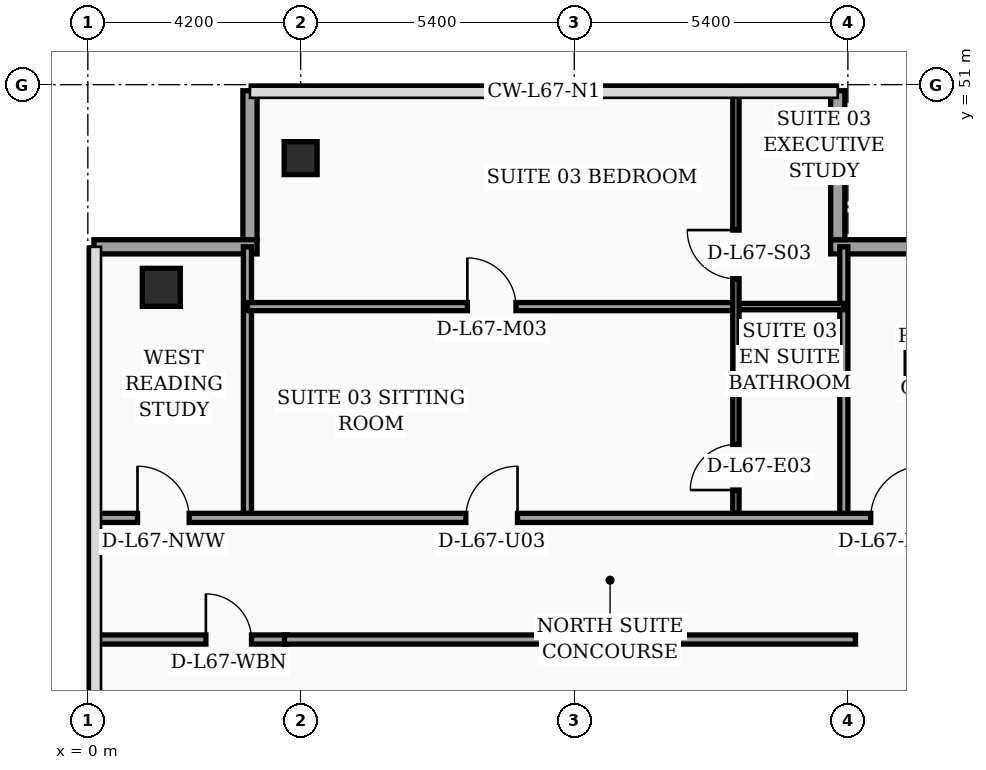
"""IFC4 building model, lengths in metres.
Left out: names, types, materials, properties, quantities, classifications, styles, units other than length and angle.
Written with IfcOpenShell. Run it as: python <this file> out.ifc"""

import sys

from ifc_helpers import new_model, si_unit, direction, frame, frame_2d, origin, origin_2d, place, context, subcontext, project, spatial, rectangle, hollow_rectangle, extrude, element, fill, save


model = new_model("IFC4")
c1 = context("Model", 3, precision=1e-05, world=origin(), true_north=direction((0.0, 1.0)))
c2 = subcontext(c1, "Body", "Model", "MODEL_VIEW")
j1 = project(units=[si_unit("LENGTHUNIT", "METRE"), si_unit("PLANEANGLEUNIT", "RADIAN")], contexts=[c1])
p1 = place(None, origin())
s1 = spatial("IfcSite", under=j1, at=p1, CompositionType="ELEMENT")
p2 = place(p1, origin())
s2 = spatial("IfcBuilding", under=s1, at=p2, CompositionType="ELEMENT")
p3 = place(p2, frame((0.0, 0.0, 271.1)))
s3 = spatial("IfcBuildingStorey", under=s2, at=p3, CompositionType="ELEMENT", Elevation=271.1)
p4 = place(p3, frame((1.45, 47.0, 0.0), z_axis=(0.0, 0.0, 1.0), x_axis=(1.0, 0.0, 0.0)))
e1 = element("IfcColumn", 1, at=p4, inside=s3, PredefinedType="COLUMN", context=c2, shape_type="SweptSolid", body=[
    extrude(hollow_rectangle(XDim=0.75, YDim=0.75, WallThickness=0.032, at=origin_2d()), origin(), (0.0, 0.0, 1.0), 3.56),
])
p5 = place(p3, frame((4.2, 49.55, 0.0), z_axis=(0.0, 0.0, 1.0), x_axis=(1.0, 0.0, 0.0)))
e2 = element("IfcColumn", 2, at=p5, inside=s3, PredefinedType="COLUMN", context=c2, shape_type="SweptSolid", body=[
    extrude(hollow_rectangle(XDim=0.65, YDim=0.65, WallThickness=0.028, at=origin_2d()), origin(), (0.0, 0.0, 1.0), 3.56),
])
p6 = place(p3, frame((17.9, 47.8, 0.0), z_axis=(0.0, 0.0, 1.0), x_axis=(-1.0, 0.0, 0.0)))
e3 = element("IfcWall", 3, at=p6, inside=s3, PredefinedType="SOLIDWALL", context=c2, shape_type="SweptSolid", body=[
    extrude(rectangle(XDim=3.24, YDim=0.28, at=frame_2d((1.62, 0.0))), origin(), (0.0, 0.0, 1.0), 3.56),
])
p7 = place(p3, frame((14.8, 47.94, 0.0), z_axis=(0.0, 0.0, 1.0), x_axis=(0.0, 1.0, 0.0)))
e4 = element("IfcWall", 4, at=p7, inside=s3, PredefinedType="SOLIDWALL", context=c2, shape_type="SweptSolid", body=[
    extrude(rectangle(XDim=2.94, YDim=0.28, at=frame_2d((1.47, 0.0))), origin(), (0.0, 0.0, 1.0), 3.56),
])
p8 = place(p3, frame((3.2, 50.88, 0.0), z_axis=(0.0, 0.0, 1.0), x_axis=(0.0, -1.0, 0.0)))
e5 = element("IfcWall", 5, at=p8, inside=s3, PredefinedType="SOLIDWALL", context=c2, shape_type="SweptSolid", body=[
    extrude(rectangle(XDim=2.94, YDim=0.28, at=frame_2d((1.47, 0.0))), origin(), (0.0, 0.0, 1.0), 3.09),
])
p9 = place(p3, frame((3.34, 47.8, 0.0), z_axis=(0.0, 0.0, 1.0), x_axis=(-1.0, 0.0, 0.0)))
e6 = element("IfcWall", 6, at=p9, inside=s3, PredefinedType="SOLIDWALL", context=c2, shape_type="SweptSolid", body=[
    extrude(rectangle(XDim=3.22, YDim=0.28, at=frame_2d((1.61, 0.0))), origin(), (0.0, 0.0, 1.0), 3.09),
])
p10 = place(p3, frame((0.08, 40.05, 0.0), z_axis=(0.0, 0.0, 1.0), x_axis=(1.0, 0.0, 0.0)))
e7 = element("IfcWall", 7, at=p10, inside=s3, PredefinedType="PARTITIONING", context=c2, shape_type="SweptSolid", body=[
    extrude(rectangle(XDim=3.85, YDim=0.18, at=frame_2d((1.925, 0.0))), origin(), (0.0, 0.0, 1.0), 2.99),
])
p11 = place(p10, frame((2.25, 0.0, 0.0)))
e8 = element("IfcOpeningElement", 8, at=p11, cuts=e7, PredefinedType="OPENING", context=c2, shape_type="SweptSolid", body=[
    extrude(rectangle(XDim=0.9, YDim=2.15, at=frame_2d((0.45, 1.075))), frame((0.0, 0.1, 0.0), z_axis=(0.0, -1.0, 0.0), x_axis=(1.0, 0.0, 0.0)), (0.0, 0.0, 1.0), 0.2),
])
p12 = place(p3, frame((3.15, 42.45, 0.0), z_axis=(0.0, 0.0, 1.0), x_axis=(0.0, 1.0, 0.0)))
e9 = element("IfcWall", 9, at=p12, inside=s3, PredefinedType="PARTITIONING", context=c2, shape_type="SweptSolid", body=[
    extrude(rectangle(XDim=5.35, YDim=0.16, at=frame_2d((2.675, 0.0))), origin(), (0.0, 0.0, 1.0), 3.14),
])
p13 = place(p3, frame((14.92, 42.45, 0.0), z_axis=(0.0, 0.0, 1.0), x_axis=(0.0, 1.0, 0.0)))
e10 = element("IfcWall", 10, at=p13, inside=s3, PredefinedType="PARTITIONING", context=c2, shape_type="SweptSolid", body=[
    extrude(rectangle(XDim=5.35, YDim=0.16, at=frame_2d((2.675, 0.0))), origin(), (0.0, 0.0, 1.0), 3.09),
])
p14 = place(p3, frame((12.79, 46.62, 0.0), z_axis=(0.0, 0.0, 1.0), x_axis=(1.0, 0.0, 0.0)))
e11 = element("IfcWall", 11, at=p14, inside=s3, PredefinedType="PARTITIONING", context=c2, shape_type="SweptSolid", body=[
    extrude(rectangle(XDim=2.13, YDim=0.125, at=frame_2d((1.065, 0.0))), origin(), (0.0, 0.0, 1.0), 3.09),
])
p15 = place(p3, frame((3.15, 46.62, 0.0), z_axis=(0.0, 0.0, 1.0), x_axis=(1.0, 0.0, 0.0)))
e12 = element("IfcWall", 12, at=p15, inside=s3, PredefinedType="PARTITIONING", context=c2, shape_type="SweptSolid", body=[
    extrude(rectangle(XDim=9.64, YDim=0.16, at=frame_2d((4.82, 0.0))), origin(), (0.0, 0.0, 1.0), 2.99),
])
p16 = place(p15, frame((4.34, 0.0, 0.0)))
e13 = element("IfcOpeningElement", 13, at=p16, cuts=e12, PredefinedType="OPENING", context=c2, shape_type="SweptSolid", body=[
    extrude(rectangle(XDim=0.96, YDim=2.2, at=frame_2d((0.48, 1.1))), frame((0.0, 0.09, 0.0), z_axis=(0.0, -1.0, 0.0), x_axis=(1.0, 0.0, 0.0)), (0.0, 0.0, 1.0), 0.18),
])
p17 = place(p3, frame((12.79, 42.45, 0.0), z_axis=(0.0, 0.0, 1.0), x_axis=(0.0, 1.0, 0.0)))
e14 = element("IfcWall", 14, at=p17, inside=s3, PredefinedType="PARTITIONING", context=c2, shape_type="SweptSolid", body=[
    extrude(rectangle(XDim=8.49, YDim=0.125, at=frame_2d((4.245, 0.0))), origin(), (0.0, 0.0, 1.0), 3.09),
])
p18 = place(p17, frame((0.55, 0.0, 0.0)))
e15 = element("IfcOpeningElement", 15, at=p18, cuts=e14, PredefinedType="OPENING", context=c2, shape_type="SweptSolid", body=[
    extrude(rectangle(XDim=0.9, YDim=2.15, at=frame_2d((0.45, 1.075))), frame((0.0, 0.073, 0.0), z_axis=(0.0, -1.0, 0.0), x_axis=(1.0, 0.0, 0.0)), (0.0, 0.0, 1.0), 0.145),
])
p19 = place(p17, frame((4.72, 0.0, 0.0)))
e16 = element("IfcOpeningElement", 16, at=p19, cuts=e14, PredefinedType="OPENING", context=c2, shape_type="SweptSolid", body=[
    extrude(rectangle(XDim=0.96, YDim=2.2, at=frame_2d((0.48, 1.1))), frame((0.0, 0.073, 0.0), z_axis=(0.0, -1.0, 0.0), x_axis=(1.0, 0.0, 0.0)), (0.0, 0.0, 1.0), 0.145),
])
p20 = place(p3, frame((0.08, 42.45, 0.0), z_axis=(0.0, 0.0, 1.0), x_axis=(1.0, 0.0, 0.0)))
e17 = element("IfcWall", 17, at=p20, inside=s3, PredefinedType="PARTITIONING", context=c2, shape_type="SweptSolid", body=[
    extrude(rectangle(XDim=17.77, YDim=0.18, at=frame_2d((8.885, 0.0))), origin(), (0.0, 0.0, 1.0), 2.99),
])
p21 = place(p20, frame((0.9, 0.0, 0.0)))
e18 = element("IfcOpeningElement", 18, at=p21, cuts=e17, PredefinedType="OPENING", context=c2, shape_type="SweptSolid", body=[
    extrude(rectangle(XDim=1.02, YDim=2.2, at=frame_2d((0.51, 1.1))), frame((0.0, 0.1, 0.0), z_axis=(0.0, -1.0, 0.0), x_axis=(1.0, 0.0, 0.0)), (0.0, 0.0, 1.0), 0.2),
])
p22 = place(p20, frame((7.38, 0.0, 0.0)))
e19 = element("IfcOpeningElement", 19, at=p22, cuts=e17, PredefinedType="OPENING", context=c2, shape_type="SweptSolid", body=[
    extrude(rectangle(XDim=1.02, YDim=2.2, at=frame_2d((0.51, 1.1))), frame((0.0, 0.1, 0.0), z_axis=(0.0, -1.0, 0.0), x_axis=(1.0, 0.0, 0.0)), (0.0, 0.0, 1.0), 0.2),
])
p23 = place(p20, frame((15.37, 0.0, 0.0)))
e20 = element("IfcOpeningElement", 20, at=p23, cuts=e17, PredefinedType="OPENING", context=c2, shape_type="SweptSolid", body=[
    extrude(rectangle(XDim=1.02, YDim=2.2, at=frame_2d((0.51, 1.1))), frame((0.0, 0.1, 0.0), z_axis=(0.0, -1.0, 0.0), x_axis=(1.0, 0.0, 0.0)), (0.0, 0.0, 1.0), 0.2),
])
p24 = place(p3, frame((3.88, 40.05, 0.0), z_axis=(0.0, 0.0, 1.0), x_axis=(1.0, 0.0, 0.0)))
e21 = element("IfcWall", 21, at=p24, inside=s3, PredefinedType="PARTITIONING", context=c2, shape_type="SweptSolid", body=[
    extrude(rectangle(XDim=11.27, YDim=0.18, at=frame_2d((5.635, 0.0))), origin(), (0.0, 0.0, 1.0), 2.99),
])
p25 = place(p11, origin())
e22 = element("IfcDoor", 22, at=p25, inside=s3, OperationType="SINGLE_SWING_LEFT", PredefinedType="DOOR", context=c2, shape_type="SweptSolid", body=[
    extrude(rectangle(XDim=0.9, YDim=2.15, at=frame_2d((0.45, 1.075))), frame((0.0, 0.025, 0.0), z_axis=(0.0, -1.0, 0.0), x_axis=(1.0, 0.0, 0.0)), (0.0, 0.0, 1.0), 0.05),
])
fill(e8, e22)
p26 = place(p16, origin())
e23 = element("IfcDoor", 23, at=p26, inside=s3, OperationType="SINGLE_SWING_LEFT", PredefinedType="DOOR", context=c2, shape_type="SweptSolid", body=[
    extrude(rectangle(XDim=0.96, YDim=2.2, at=frame_2d((0.48, 1.1))), frame((0.0, 0.025, 0.0), z_axis=(0.0, -1.0, 0.0), x_axis=(1.0, 0.0, 0.0)), (0.0, 0.0, 1.0), 0.05),
])
fill(e13, e23)
p27 = place(p18, origin())
e24 = element("IfcDoor", 24, at=p27, inside=s3, OperationType="SINGLE_SWING_LEFT", PredefinedType="DOOR", context=c2, shape_type="SweptSolid", body=[
    extrude(rectangle(XDim=0.9, YDim=2.15, at=frame_2d((0.45, 1.075))), frame((0.0, 0.025, 0.0), z_axis=(0.0, -1.0, 0.0), x_axis=(1.0, 0.0, 0.0)), (0.0, 0.0, 1.0), 0.05),
])
fill(e15, e24)
p28 = place(p19, origin())
e25 = element("IfcDoor", 25, at=p28, inside=s3, OperationType="SINGLE_SWING_RIGHT", PredefinedType="DOOR", context=c2, shape_type="SweptSolid", body=[
    extrude(rectangle(XDim=0.96, YDim=2.2, at=frame_2d((0.48, 1.1))), frame((0.0, 0.025, 0.0), z_axis=(0.0, -1.0, 0.0), x_axis=(1.0, 0.0, 0.0)), (0.0, 0.0, 1.0), 0.05),
])
fill(e16, e25)
p29 = place(p21, origin())
e26 = element("IfcDoor", 26, at=p29, inside=s3, OperationType="SINGLE_SWING_LEFT", PredefinedType="DOOR", context=c2, shape_type="SweptSolid", body=[
    extrude(rectangle(XDim=1.02, YDim=2.2, at=frame_2d((0.51, 1.1))), frame((0.0, 0.025, 0.0), z_axis=(0.0, -1.0, 0.0), x_axis=(1.0, 0.0, 0.0)), (0.0, 0.0, 1.0), 0.05),
])
fill(e18, e26)
p30 = place(p22, origin())
e27 = element("IfcDoor", 27, at=p30, inside=s3, OperationType="SINGLE_SWING_RIGHT", PredefinedType="DOOR", context=c2, shape_type="SweptSolid", body=[
    extrude(rectangle(XDim=1.02, YDim=2.2, at=frame_2d((0.51, 1.1))), frame((0.0, 0.025, 0.0), z_axis=(0.0, -1.0, 0.0), x_axis=(1.0, 0.0, 0.0)), (0.0, 0.0, 1.0), 0.05),
])
fill(e19, e27)
p31 = place(p23, origin())
e28 = element("IfcDoor", 28, at=p31, inside=s3, OperationType="SINGLE_SWING_RIGHT", PredefinedType="DOOR", context=c2, shape_type="SweptSolid", body=[
    extrude(rectangle(XDim=1.02, YDim=2.2, at=frame_2d((0.51, 1.1))), frame((0.0, 0.025, 0.0), z_axis=(0.0, -1.0, 0.0), x_axis=(1.0, 0.0, 0.0)), (0.0, 0.0, 1.0), 0.05),
])
fill(e20, e28)
save(model, sys.argv[1])
